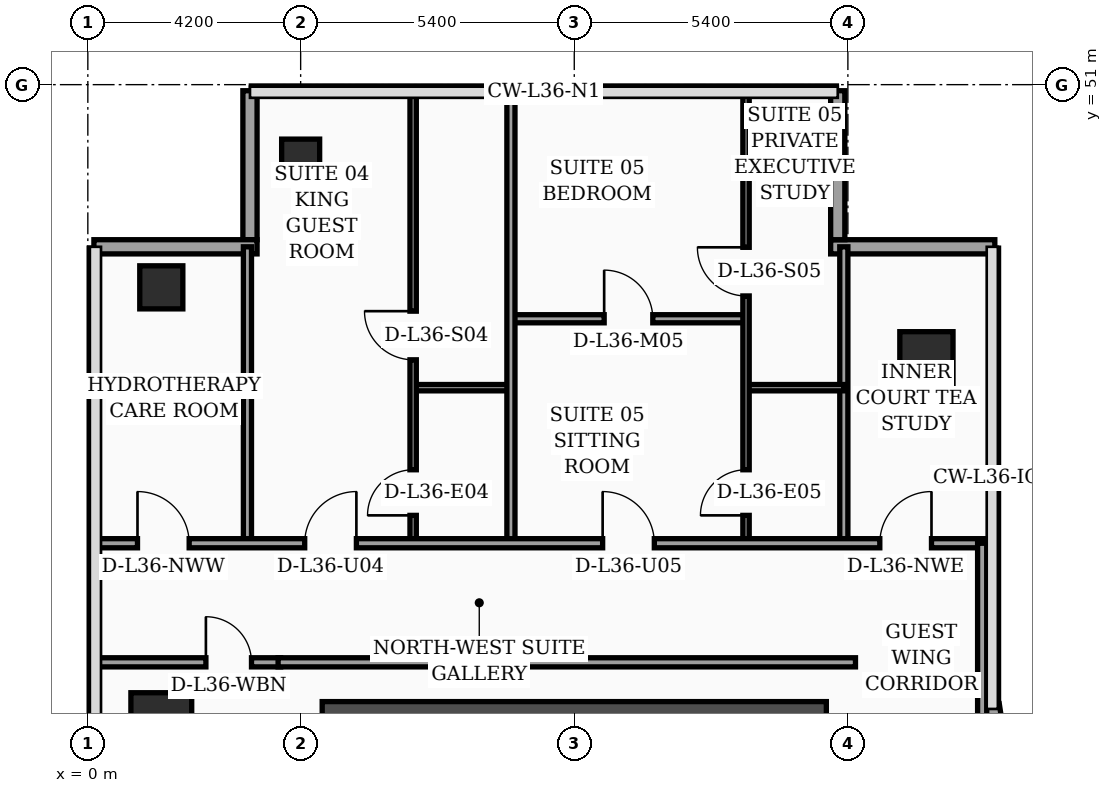
"""IFC4 building model, lengths in metres.
Left out: names, types, materials, properties, quantities, classifications, styles, units other than length and angle.
Written with IfcOpenShell. Run it as: python <this file> out.ifc"""

import sys

from ifc_helpers import new_model, si_unit, direction, frame, frame_2d, origin, origin_2d, place, context, subcontext, project, spatial, rectangle, hollow_rectangle, extrude, element, fill, save


model = new_model("IFC4")
c1 = context("Model", 3, precision=1e-05, world=origin(), true_north=direction((0.0, 1.0)))
c2 = subcontext(c1, "Body", "Model", "MODEL_VIEW")
j1 = project(units=[si_unit("LENGTHUNIT", "METRE"), si_unit("PLANEANGLEUNIT", "RADIAN")], contexts=[c1])
p1 = place(None, origin())
s1 = spatial("IfcSite", under=j1, at=p1, CompositionType="ELEMENT")
p2 = place(p1, origin())
s2 = spatial("IfcBuilding", under=s1, at=p2, CompositionType="ELEMENT")
p3 = place(p2, frame((0.0, 0.0, 148.5)))
s3 = spatial("IfcBuildingStorey", under=s2, at=p3, CompositionType="ELEMENT", Elevation=148.5)
p4 = place(p3, frame((4.625, 38.4, 0.0), z_axis=(0.0, 0.0, 1.0), x_axis=(1.0, 0.0, 0.0)))
e1 = element("IfcWall", 1, at=p4, inside=s3, PredefinedType="SHEAR", context=c2, shape_type="SweptSolid", body=[
    extrude(rectangle(XDim=9.95, YDim=0.85, at=frame_2d((4.975, 0.0))), origin(), (0.0, 0.0, 1.0), 3.56),
])
p5 = place(p3, frame((1.45, 38.4, 0.0), z_axis=(0.0, 0.0, 1.0), x_axis=(1.0, 0.0, 0.0)))
e2 = element("IfcColumn", 2, at=p5, inside=s3, PredefinedType="COLUMN", context=c2, shape_type="SweptSolid", body=[
    extrude(rectangle(XDim=1.2, YDim=1.2, at=origin_2d()), origin(), (0.0, 0.0, 1.0), 3.56),
])
p6 = place(p3, frame((1.45, 47.0, 0.0), z_axis=(0.0, 0.0, 1.0), x_axis=(1.0, 0.0, 0.0)))
e3 = element("IfcColumn", 3, at=p6, inside=s3, PredefinedType="COLUMN", context=c2, shape_type="SweptSolid", body=[
    extrude(hollow_rectangle(XDim=0.85, YDim=0.85, WallThickness=0.036, at=origin_2d()), origin(), (0.0, 0.0, 1.0), 3.56),
])
p7 = place(p3, frame((4.2, 49.55, 0.0), z_axis=(0.0, 0.0, 1.0), x_axis=(1.0, 0.0, 0.0)))
e4 = element("IfcColumn", 4, at=p7, inside=s3, PredefinedType="COLUMN", context=c2, shape_type="SweptSolid", body=[
    extrude(hollow_rectangle(XDim=0.75, YDim=0.75, WallThickness=0.032, at=origin_2d()), origin(), (0.0, 0.0, 1.0), 3.56),
])
p8 = place(p3, frame((16.55, 45.6, 0.0), z_axis=(0.0, 0.0, 1.0), x_axis=(1.0, 0.0, 0.0)))
e5 = element("IfcColumn", 5, at=p8, inside=s3, PredefinedType="COLUMN", context=c2, shape_type="SweptSolid", body=[
    extrude(rectangle(XDim=1.05, YDim=1.05, at=origin_2d()), origin(), (0.0, 0.0, 1.0), 3.56),
])
p9 = place(p3, frame((17.962, 38.03, 0.0), z_axis=(0.0, 0.0, 1.0), x_axis=(-0.15141125477, 0.988470855377, 0.0)))
e6 = element("IfcWall", 6, at=p9, inside=s3, PredefinedType="SOLIDWALL", context=c2, shape_type="SweptSolid", body=[
    extrude(rectangle(XDim=0.739, YDim=0.28, at=frame_2d((0.369, 0.0))), origin(), (0.0, 0.0, 1.0), 3.56),
])
p10 = place(p3, frame((17.9, 47.8, 0.0), z_axis=(0.0, 0.0, 1.0), x_axis=(-1.0, 0.0, 0.0)))
e7 = element("IfcWall", 7, at=p10, inside=s3, PredefinedType="SOLIDWALL", context=c2, shape_type="SweptSolid", body=[
    extrude(rectangle(XDim=3.24, YDim=0.28, at=frame_2d((1.62, 0.0))), origin(), (0.0, 0.0, 1.0), 3.56),
])
p11 = place(p3, frame((14.8, 47.94, 0.0), z_axis=(0.0, 0.0, 1.0), x_axis=(0.0, 1.0, 0.0)))
e8 = element("IfcWall", 8, at=p11, inside=s3, PredefinedType="SOLIDWALL", context=c2, shape_type="SweptSolid", body=[
    extrude(rectangle(XDim=2.94, YDim=0.28, at=frame_2d((1.47, 0.0))), origin(), (0.0, 0.0, 1.0), 3.56),
])
p12 = place(p3, frame((3.2, 50.88, 0.0), z_axis=(0.0, 0.0, 1.0), x_axis=(0.0, -1.0, 0.0)))
e9 = element("IfcWall", 9, at=p12, inside=s3, PredefinedType="SOLIDWALL", context=c2, shape_type="SweptSolid", body=[
    extrude(rectangle(XDim=2.94, YDim=0.28, at=frame_2d((1.47, 0.0))), origin(), (0.0, 0.0, 1.0), 3.04),
])
p13 = place(p3, frame((3.34, 47.8, 0.0), z_axis=(0.0, 0.0, 1.0), x_axis=(-1.0, 0.0, 0.0)))
e10 = element("IfcWall", 10, at=p13, inside=s3, PredefinedType="SOLIDWALL", context=c2, shape_type="SweptSolid", body=[
    extrude(rectangle(XDim=3.22, YDim=0.28, at=frame_2d((1.61, 0.0))), origin(), (0.0, 0.0, 1.0), 3.04),
])
p14 = place(p3, frame((0.08, 39.6, 0.0), z_axis=(0.0, 0.0, 1.0), x_axis=(1.0, 0.0, 0.0)))
e11 = element("IfcWall", 11, at=p14, inside=s3, PredefinedType="PARTITIONING", context=c2, shape_type="SweptSolid", body=[
    extrude(rectangle(XDim=3.725, YDim=0.18, at=frame_2d((1.862, 0.0))), origin(), (0.0, 0.0, 1.0), 2.94),
])
p15 = place(p14, frame((2.25, 0.0, 0.0)))
e12 = element("IfcOpeningElement", 12, at=p15, cuts=e11, PredefinedType="OPENING", context=c2, shape_type="SweptSolid", body=[
    extrude(rectangle(XDim=0.9, YDim=2.15, at=frame_2d((0.45, 1.075))), frame((0.0, 0.1, 0.0), z_axis=(0.0, -1.0, 0.0), x_axis=(1.0, 0.0, 0.0)), (0.0, 0.0, 1.0), 0.2),
])
p16 = place(p3, frame((3.15, 41.95, 0.0), z_axis=(0.0, 0.0, 1.0), x_axis=(0.0, 1.0, 0.0)))
e13 = element("IfcWall", 13, at=p16, inside=s3, PredefinedType="PARTITIONING", context=c2, shape_type="SweptSolid", body=[
    extrude(rectangle(XDim=5.85, YDim=0.16, at=frame_2d((2.925, 0.0))), origin(), (0.0, 0.0, 1.0), 3.14),
])
p17 = place(p3, frame((14.92, 41.95, 0.0), z_axis=(0.0, 0.0, 1.0), x_axis=(0.0, 1.0, 0.0)))
e14 = element("IfcWall", 14, at=p17, inside=s3, PredefinedType="PARTITIONING", context=c2, shape_type="SweptSolid", body=[
    extrude(rectangle(XDim=5.85, YDim=0.16, at=frame_2d((2.925, 0.0))), origin(), (0.0, 0.0, 1.0), 3.04),
])
p18 = place(p3, frame((6.42, 45.02, 0.0), z_axis=(0.0, 0.0, 1.0), x_axis=(1.0, 0.0, 0.0)))
e15 = element("IfcWall", 15, at=p18, inside=s3, PredefinedType="PARTITIONING", context=c2, shape_type="SweptSolid", body=[
    extrude(rectangle(XDim=1.93, YDim=0.125, at=frame_2d((0.965, 0.0))), origin(), (0.0, 0.0, 1.0), 3.56),
])
p19 = place(p3, frame((6.42, 41.95, 0.0), z_axis=(0.0, 0.0, 1.0), x_axis=(0.0, 1.0, 0.0)))
e16 = element("IfcWall", 16, at=p19, inside=s3, PredefinedType="PARTITIONING", context=c2, shape_type="SweptSolid", body=[
    extrude(rectangle(XDim=8.99, YDim=0.125, at=frame_2d((4.495, 0.0))), origin(), (0.0, 0.0, 1.0), 3.04),
])
p20 = place(p19, frame((0.55, 0.0, 0.0)))
e17 = element("IfcOpeningElement", 17, at=p20, cuts=e16, PredefinedType="OPENING", context=c2, shape_type="SweptSolid", body=[
    extrude(rectangle(XDim=0.9, YDim=2.15, at=frame_2d((0.45, 1.075))), frame((0.0, 0.073, 0.0), z_axis=(0.0, -1.0, 0.0), x_axis=(1.0, 0.0, 0.0)), (0.0, 0.0, 1.0), 0.145),
])
p21 = place(p19, frame((3.62, 0.0, 0.0)))
e18 = element("IfcOpeningElement", 18, at=p21, cuts=e16, PredefinedType="OPENING", context=c2, shape_type="SweptSolid", body=[
    extrude(rectangle(XDim=0.96, YDim=2.2, at=frame_2d((0.48, 1.1))), frame((0.0, 0.073, 0.0), z_axis=(0.0, -1.0, 0.0), x_axis=(1.0, 0.0, 0.0)), (0.0, 0.0, 1.0), 0.145),
])
p22 = place(p3, frame((12.99, 45.02, 0.0), z_axis=(0.0, 0.0, 1.0), x_axis=(1.0, 0.0, 0.0)))
e19 = element("IfcWall", 19, at=p22, inside=s3, PredefinedType="PARTITIONING", context=c2, shape_type="SweptSolid", body=[
    extrude(rectangle(XDim=1.93, YDim=0.125, at=frame_2d((0.965, 0.0))), origin(), (0.0, 0.0, 1.0), 3.56),
])
p23 = place(p3, frame((8.35, 46.38, 0.0), z_axis=(0.0, 0.0, 1.0), x_axis=(1.0, 0.0, 0.0)))
e20 = element("IfcWall", 20, at=p23, inside=s3, PredefinedType="PARTITIONING", context=c2, shape_type="SweptSolid", body=[
    extrude(rectangle(XDim=4.64, YDim=0.16, at=frame_2d((2.32, 0.0))), origin(), (0.0, 0.0, 1.0), 3.04),
])
p24 = place(p23, frame((1.84, 0.0, 0.0)))
e21 = element("IfcOpeningElement", 21, at=p24, cuts=e20, PredefinedType="OPENING", context=c2, shape_type="SweptSolid", body=[
    extrude(rectangle(XDim=0.96, YDim=2.2, at=frame_2d((0.48, 1.1))), frame((0.0, 0.09, 0.0), z_axis=(0.0, -1.0, 0.0), x_axis=(1.0, 0.0, 0.0)), (0.0, 0.0, 1.0), 0.18),
])
p25 = place(p3, frame((12.99, 41.95, 0.0), z_axis=(0.0, 0.0, 1.0), x_axis=(0.0, 1.0, 0.0)))
e22 = element("IfcWall", 22, at=p25, inside=s3, PredefinedType="PARTITIONING", context=c2, shape_type="SweptSolid", body=[
    extrude(rectangle(XDim=8.99, YDim=0.125, at=frame_2d((4.495, 0.0))), origin(), (0.0, 0.0, 1.0), 3.04),
])
p26 = place(p25, frame((0.55, 0.0, 0.0)))
e23 = element("IfcOpeningElement", 23, at=p26, cuts=e22, PredefinedType="OPENING", context=c2, shape_type="SweptSolid", body=[
    extrude(rectangle(XDim=0.9, YDim=2.15, at=frame_2d((0.45, 1.075))), frame((0.0, 0.073, 0.0), z_axis=(0.0, -1.0, 0.0), x_axis=(1.0, 0.0, 0.0)), (0.0, 0.0, 1.0), 0.145),
])
p27 = place(p25, frame((4.88, 0.0, 0.0)))
e24 = element("IfcOpeningElement", 24, at=p27, cuts=e22, PredefinedType="OPENING", context=c2, shape_type="SweptSolid", body=[
    extrude(rectangle(XDim=0.96, YDim=2.2, at=frame_2d((0.48, 1.1))), frame((0.0, 0.073, 0.0), z_axis=(0.0, -1.0, 0.0), x_axis=(1.0, 0.0, 0.0)), (0.0, 0.0, 1.0), 0.145),
])
p28 = place(p3, frame((8.35, 41.95, 0.0), z_axis=(0.0, 0.0, 1.0), x_axis=(0.0, 1.0, 0.0)))
e25 = element("IfcWall", 25, at=p28, inside=s3, PredefinedType="PARTITIONING", context=c2, shape_type="SweptSolid", body=[
    extrude(rectangle(XDim=8.99, YDim=0.16, at=frame_2d((4.495, 0.0))), origin(), (0.0, 0.0, 1.0), 3.04),
])
p29 = place(p3, frame((0.08, 41.95, 0.0), z_axis=(0.0, 0.0, 1.0), x_axis=(1.0, 0.0, 0.0)))
e26 = element("IfcWall", 26, at=p29, inside=s3, PredefinedType="PARTITIONING", context=c2, shape_type="SweptSolid", body=[
    extrude(rectangle(XDim=17.77, YDim=0.18, at=frame_2d((8.885, 0.0))), origin(), (0.0, 0.0, 1.0), 2.94),
])
p30 = place(p29, frame((0.9, 0.0, 0.0)))
e27 = element("IfcOpeningElement", 27, at=p30, cuts=e26, PredefinedType="OPENING", context=c2, shape_type="SweptSolid", body=[
    extrude(rectangle(XDim=1.02, YDim=2.2, at=frame_2d((0.51, 1.1))), frame((0.0, 0.1, 0.0), z_axis=(0.0, -1.0, 0.0), x_axis=(1.0, 0.0, 0.0)), (0.0, 0.0, 1.0), 0.2),
])
p31 = place(p29, frame((4.2, 0.0, 0.0)))
e28 = element("IfcOpeningElement", 28, at=p31, cuts=e26, PredefinedType="OPENING", context=c2, shape_type="SweptSolid", body=[
    extrude(rectangle(XDim=1.02, YDim=2.2, at=frame_2d((0.51, 1.1))), frame((0.0, 0.1, 0.0), z_axis=(0.0, -1.0, 0.0), x_axis=(1.0, 0.0, 0.0)), (0.0, 0.0, 1.0), 0.2),
])
p32 = place(p29, frame((10.08, 0.0, 0.0)))
e29 = element("IfcOpeningElement", 29, at=p32, cuts=e26, PredefinedType="OPENING", context=c2, shape_type="SweptSolid", body=[
    extrude(rectangle(XDim=1.02, YDim=2.2, at=frame_2d((0.51, 1.1))), frame((0.0, 0.1, 0.0), z_axis=(0.0, -1.0, 0.0), x_axis=(1.0, 0.0, 0.0)), (0.0, 0.0, 1.0), 0.2),
])
p33 = place(p29, frame((15.55, 0.0, 0.0)))
e30 = element("IfcOpeningElement", 30, at=p33, cuts=e26, PredefinedType="OPENING", context=c2, shape_type="SweptSolid", body=[
    extrude(rectangle(XDim=1.02, YDim=2.2, at=frame_2d((0.51, 1.1))), frame((0.0, 0.1, 0.0), z_axis=(0.0, -1.0, 0.0), x_axis=(1.0, 0.0, 0.0)), (0.0, 0.0, 1.0), 0.2),
])
p34 = place(p3, frame((17.65, 24.3, 0.0), z_axis=(0.0, 0.0, 1.0), x_axis=(0.0, 1.0, 0.0)))
e31 = element("IfcWall", 31, at=p34, inside=s3, PredefinedType="PARTITIONING", context=c2, shape_type="SweptSolid", body=[
    extrude(rectangle(XDim=17.65, YDim=0.18, at=frame_2d((8.825, 0.0))), origin(), (0.0, 0.0, 1.0), 2.94),
])
p35 = place(p3, frame((3.755, 39.6, 0.0), z_axis=(0.0, 0.0, 1.0), x_axis=(1.0, 0.0, 0.0)))
e32 = element("IfcWall", 32, at=p35, inside=s3, PredefinedType="PARTITIONING", context=c2, shape_type="SweptSolid", body=[
    extrude(rectangle(XDim=11.395, YDim=0.18, at=frame_2d((5.698, 0.0))), origin(), (0.0, 0.0, 1.0), 2.94),
])
p36 = place(p15, origin())
e33 = element("IfcDoor", 33, at=p36, inside=s3, OperationType="SINGLE_SWING_LEFT", PredefinedType="DOOR", context=c2, shape_type="SweptSolid", body=[
    extrude(rectangle(XDim=0.9, YDim=2.15, at=frame_2d((0.45, 1.075))), frame((0.0, 0.025, 0.0), z_axis=(0.0, -1.0, 0.0), x_axis=(1.0, 0.0, 0.0)), (0.0, 0.0, 1.0), 0.05),
])
fill(e12, e33)
p37 = place(p20, origin())
e34 = element("IfcDoor", 34, at=p37, inside=s3, OperationType="SINGLE_SWING_LEFT", PredefinedType="DOOR", context=c2, shape_type="SweptSolid", body=[
    extrude(rectangle(XDim=0.9, YDim=2.15, at=frame_2d((0.45, 1.075))), frame((0.0, 0.025, 0.0), z_axis=(0.0, -1.0, 0.0), x_axis=(1.0, 0.0, 0.0)), (0.0, 0.0, 1.0), 0.05),
])
fill(e17, e34)
p38 = place(p21, origin())
e35 = element("IfcDoor", 35, at=p38, inside=s3, OperationType="SINGLE_SWING_RIGHT", PredefinedType="DOOR", context=c2, shape_type="SweptSolid", body=[
    extrude(rectangle(XDim=0.96, YDim=2.2, at=frame_2d((0.48, 1.1))), frame((0.0, 0.025, 0.0), z_axis=(0.0, -1.0, 0.0), x_axis=(1.0, 0.0, 0.0)), (0.0, 0.0, 1.0), 0.05),
])
fill(e18, e35)
p39 = place(p24, origin())
e36 = element("IfcDoor", 36, at=p39, inside=s3, OperationType="SINGLE_SWING_LEFT", PredefinedType="DOOR", context=c2, shape_type="SweptSolid", body=[
    extrude(rectangle(XDim=0.96, YDim=2.2, at=frame_2d((0.48, 1.1))), frame((0.0, 0.025, 0.0), z_axis=(0.0, -1.0, 0.0), x_axis=(1.0, 0.0, 0.0)), (0.0, 0.0, 1.0), 0.05),
])
fill(e21, e36)
p40 = place(p26, origin())
e37 = element("IfcDoor", 37, at=p40, inside=s3, OperationType="SINGLE_SWING_LEFT", PredefinedType="DOOR", context=c2, shape_type="SweptSolid", body=[
    extrude(rectangle(XDim=0.9, YDim=2.15, at=frame_2d((0.45, 1.075))), frame((0.0, 0.025, 0.0), z_axis=(0.0, -1.0, 0.0), x_axis=(1.0, 0.0, 0.0)), (0.0, 0.0, 1.0), 0.05),
])
fill(e23, e37)
p41 = place(p27, origin())
e38 = element("IfcDoor", 38, at=p41, inside=s3, OperationType="SINGLE_SWING_RIGHT", PredefinedType="DOOR", context=c2, shape_type="SweptSolid", body=[
    extrude(rectangle(XDim=0.96, YDim=2.2, at=frame_2d((0.48, 1.1))), frame((0.0, 0.025, 0.0), z_axis=(0.0, -1.0, 0.0), x_axis=(1.0, 0.0, 0.0)), (0.0, 0.0, 1.0), 0.05),
])
fill(e24, e38)
p42 = place(p30, origin())
e39 = element("IfcDoor", 39, at=p42, inside=s3, OperationType="SINGLE_SWING_LEFT", PredefinedType="DOOR", context=c2, shape_type="SweptSolid", body=[
    extrude(rectangle(XDim=1.02, YDim=2.2, at=frame_2d((0.51, 1.1))), frame((0.0, 0.025, 0.0), z_axis=(0.0, -1.0, 0.0), x_axis=(1.0, 0.0, 0.0)), (0.0, 0.0, 1.0), 0.05),
])
fill(e27, e39)
p43 = place(p31, origin())
e40 = element("IfcDoor", 40, at=p43, inside=s3, OperationType="SINGLE_SWING_RIGHT", PredefinedType="DOOR", context=c2, shape_type="SweptSolid", body=[
    extrude(rectangle(XDim=1.02, YDim=2.2, at=frame_2d((0.51, 1.1))), frame((0.0, 0.025, 0.0), z_axis=(0.0, -1.0, 0.0), x_axis=(1.0, 0.0, 0.0)), (0.0, 0.0, 1.0), 0.05),
])
fill(e28, e40)
p44 = place(p32, origin())
e41 = element("IfcDoor", 41, at=p44, inside=s3, OperationType="SINGLE_SWING_LEFT", PredefinedType="DOOR", context=c2, shape_type="SweptSolid", body=[
    extrude(rectangle(XDim=1.02, YDim=2.2, at=frame_2d((0.51, 1.1))), frame((0.0, 0.025, 0.0), z_axis=(0.0, -1.0, 0.0), x_axis=(1.0, 0.0, 0.0)), (0.0, 0.0, 1.0), 0.05),
])
fill(e29, e41)
p45 = place(p33, origin())
e42 = element("IfcDoor", 42, at=p45, inside=s3, OperationType="SINGLE_SWING_RIGHT", PredefinedType="DOOR", context=c2, shape_type="SweptSolid", body=[
    extrude(rectangle(XDim=1.02, YDim=2.2, at=frame_2d((0.51, 1.1))), frame((0.0, 0.025, 0.0), z_axis=(0.0, -1.0, 0.0), x_axis=(1.0, 0.0, 0.0)), (0.0, 0.0, 1.0), 0.05),
])
fill(e30, e42)
save(model, sys.argv[1])
